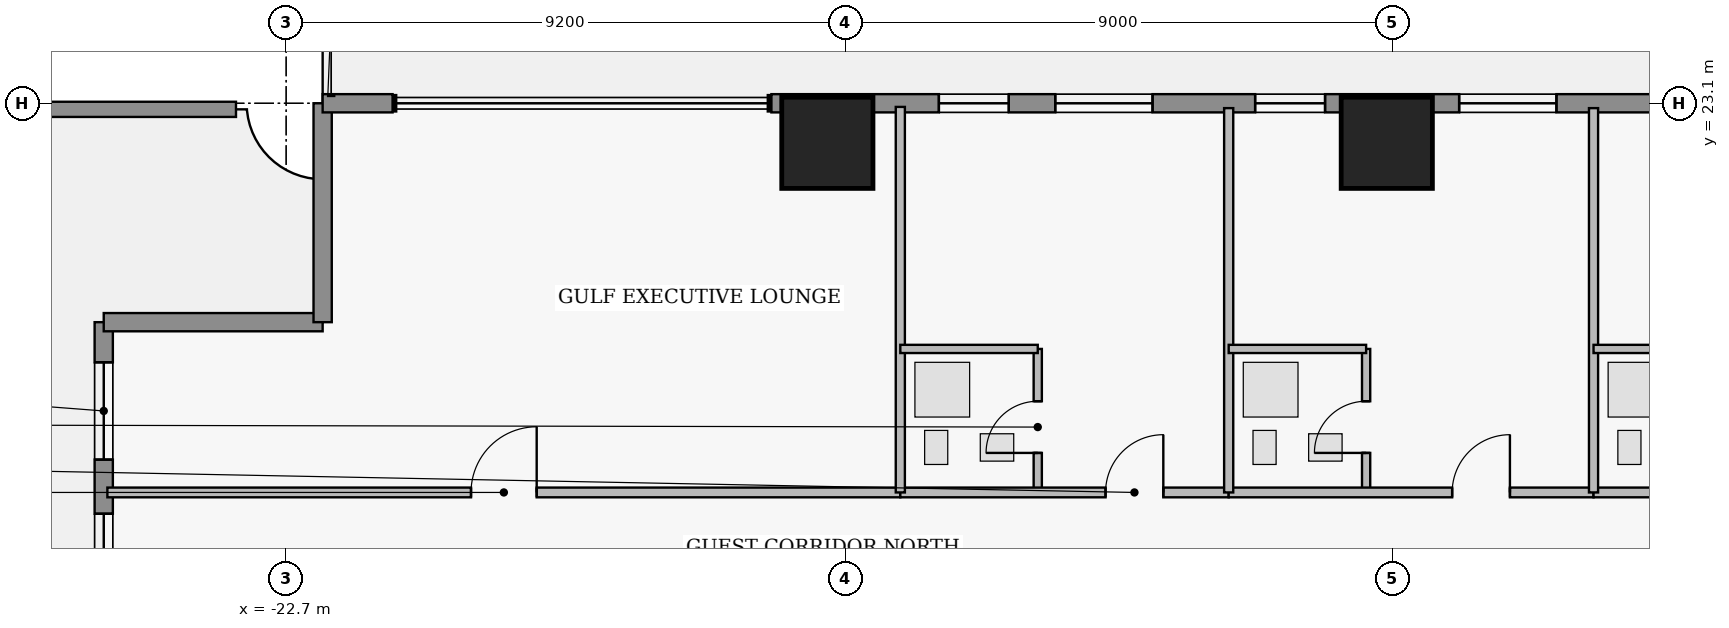
"""IFC4 building model, lengths in metres.
Left out: names, types, materials, properties, quantities, classifications, styles, units other than length and angle.
Written with IfcOpenShell. Run it as: python <this file> out.ifc"""

import sys

from ifc_helpers import new_model, si_unit, direction, frame, frame_2d, origin, origin_2d, place, context, subcontext, project, spatial, rectangle, extrude, element, fill, save


model = new_model("IFC4")
c1 = context("Model", 3, precision=1e-05, world=origin(), true_north=direction((0.0, 1.0)))
c2 = subcontext(c1, "Body", "Model", "MODEL_VIEW")
j1 = project(units=[si_unit("LENGTHUNIT", "METRE"), si_unit("PLANEANGLEUNIT", "RADIAN")], contexts=[c1])
p1 = place(None, origin())
s1 = spatial("IfcSite", under=j1, at=p1, CompositionType="ELEMENT")
p2 = place(p1, origin())
s2 = spatial("IfcBuilding", under=s1, at=p2, CompositionType="ELEMENT")
p3 = place(p2, frame((0.0, 0.0, 27.6)))
s3 = spatial("IfcBuildingStorey", under=s2, at=p3, CompositionType="ELEMENT", Elevation=27.6)
for number, where, z_axis, x_axis in (
    (1, (-13.8, 22.45, 0.0), (0.0, 0.0, 1.0), (1.0, 0.0, 0.0)),
    (2, (-4.6, 22.45, 0.0), (0.0, 0.0, 1.0), (1.0, 0.0, 0.0)),
):
    element("IfcColumn", number, at=place(p3, frame(where, z_axis=z_axis, x_axis=x_axis)), inside=s3, PredefinedType="COLUMN", context=c2, shape_type="SweptSolid", body=[
        extrude(rectangle(XDim=1.5, YDim=1.5, at=origin_2d()), origin(), (0.0, 0.0, 1.0), 3.65),
    ])
p4 = place(p3, frame((-31.82, 23.0, 0.0), z_axis=(0.0, 0.0, 1.0), x_axis=(1.0, 0.0, 0.0)))
e3 = element("IfcWall", 3, at=p4, inside=s3, PredefinedType="PARAPET", context=c2, shape_type="SweptSolid", body=[
    extrude(rectangle(XDim=8.295, YDim=0.25, at=frame_2d((4.147, 0.0))), origin(), (0.0, 0.0, 1.0), 1.15),
])
p5 = place(p3, frame((-25.7, 14.4, 0.0), z_axis=(0.0, 0.0, 1.0), x_axis=(0.0, 1.0, 0.0)))
e4 = element("IfcWall", 4, at=p5, inside=s3, PredefinedType="STANDARD", context=c2, shape_type="SweptSolid", body=[
    extrude(rectangle(XDim=5.1, YDim=0.3, at=frame_2d((2.55, 0.0))), origin(), (0.0, 0.0, 1.0), 3.43),
])
p6 = place(p5, frame((0.8, 0.0, 0.95)))
e5 = element("IfcOpeningElement", 5, at=p6, cuts=e4, PredefinedType="OPENING", context=c2, shape_type="SweptSolid", body=[
    extrude(rectangle(XDim=1.15, YDim=1.55, at=frame_2d((0.575, 0.775))), frame((0.0, 0.16, 0.0), z_axis=(0.0, -1.0, 0.0), x_axis=(1.0, 0.0, 0.0)), (0.0, 0.0, 1.0), 0.32),
])
p7 = place(p5, frame((2.84, 0.0, 0.85)))
e6 = element("IfcOpeningElement", 6, at=p7, cuts=e4, PredefinedType="OPENING", context=c2, shape_type="SweptSolid", body=[
    extrude(rectangle(XDim=1.6, YDim=1.8, at=frame_2d((0.8, 0.9))), frame((0.0, 0.16, 0.0), z_axis=(0.0, -1.0, 0.0), x_axis=(1.0, 0.0, 0.0)), (0.0, 0.0, 1.0), 0.32),
])
p8 = place(p3, frame((-25.7, 19.5, 0.0), z_axis=(0.0, 0.0, 1.0), x_axis=(1.0, 0.0, 0.0)))
e7 = element("IfcWall", 7, at=p8, inside=s3, PredefinedType="STANDARD", context=c2, shape_type="SweptSolid", body=[
    extrude(rectangle(XDim=3.6, YDim=0.3, at=frame_2d((1.8, 0.0))), origin(), (0.0, 0.0, 1.0), 3.43),
])
p9 = place(p3, frame((-22.1, 19.5, 0.0), z_axis=(0.0, 0.0, 1.0), x_axis=(0.0, 1.0, 0.0)))
e8 = element("IfcWall", 8, at=p9, inside=s3, PredefinedType="STANDARD", context=c2, shape_type="SweptSolid", body=[
    extrude(rectangle(XDim=3.6, YDim=0.3, at=frame_2d((1.8, 0.0))), origin(), (0.0, 0.0, 1.0), 3.43),
])
p10 = place(p3, frame((-22.1, 23.1, 0.0), z_axis=(0.0, 0.0, 1.0), x_axis=(1.0, 0.0, 0.0)))
e9 = element("IfcWall", 9, at=p10, inside=s3, PredefinedType="STANDARD", context=c2, shape_type="SweptSolid", body=[
    extrude(rectangle(XDim=1.15, YDim=0.3, at=frame_2d((0.575, 0.0))), origin(), (0.0, 0.0, 1.0), 3.43),
])
p11 = place(p3, frame((-14.72, 23.1, 0.0), z_axis=(0.0, 0.0, 1.0), x_axis=(1.0, 0.0, 0.0)))
e10 = element("IfcWall", 10, at=p11, inside=s3, PredefinedType="STANDARD", context=c2, shape_type="SweptSolid", body=[
    extrude(rectangle(XDim=20.24, YDim=0.3, at=frame_2d((10.12, 0.0))), origin(), (0.0, 0.0, 1.0), 3.43),
])
p12 = place(p11, frame((14.555, 0.0, 0.0)))
e11 = element("IfcOpeningElement", 11, at=p12, cuts=e10, PredefinedType="OPENING", context=c2, shape_type="SweptSolid", body=[
    extrude(rectangle(XDim=1.05, YDim=2.2, at=frame_2d((0.525, 1.1))), frame((0.0, 0.16, 0.0), z_axis=(0.0, -1.0, 0.0), x_axis=(1.0, 0.0, 0.0)), (0.0, 0.0, 1.0), 0.32),
])
p13 = place(p11, frame((4.668, 0.0, 0.85)))
e12 = element("IfcOpeningElement", 12, at=p13, cuts=e10, PredefinedType="OPENING", context=c2, shape_type="SweptSolid", body=[
    extrude(rectangle(XDim=1.6, YDim=1.8, at=frame_2d((0.8, 0.9))), frame((0.0, 0.16, 0.0), z_axis=(0.0, -1.0, 0.0), x_axis=(1.0, 0.0, 0.0)), (0.0, 0.0, 1.0), 0.32),
])
p14 = place(p11, frame((2.754, 0.0, 0.95)))
e13 = element("IfcOpeningElement", 13, at=p14, cuts=e10, PredefinedType="OPENING", context=c2, shape_type="SweptSolid", body=[
    extrude(rectangle(XDim=1.15, YDim=1.55, at=frame_2d((0.575, 0.775))), frame((0.0, 0.16, 0.0), z_axis=(0.0, -1.0, 0.0), x_axis=(1.0, 0.0, 0.0)), (0.0, 0.0, 1.0), 0.32),
])
p15 = place(p11, frame((7.955, 0.0, 0.95)))
e14 = element("IfcOpeningElement", 14, at=p15, cuts=e10, PredefinedType="OPENING", context=c2, shape_type="SweptSolid", body=[
    extrude(rectangle(XDim=1.15, YDim=1.55, at=frame_2d((0.575, 0.775))), frame((0.0, 0.16, 0.0), z_axis=(0.0, -1.0, 0.0), x_axis=(1.0, 0.0, 0.0)), (0.0, 0.0, 1.0), 0.32),
])
p16 = place(p11, frame((11.31, 0.0, 0.85)))
e15 = element("IfcOpeningElement", 15, at=p16, cuts=e10, PredefinedType="OPENING", context=c2, shape_type="SweptSolid", body=[
    extrude(rectangle(XDim=1.6, YDim=1.8, at=frame_2d((0.8, 0.9))), frame((0.0, 0.16, 0.0), z_axis=(0.0, -1.0, 0.0), x_axis=(1.0, 0.0, 0.0)), (0.0, 0.0, 1.0), 0.32),
])
p17 = place(p11, frame((16.427, 0.0, 0.85)))
e16 = element("IfcOpeningElement", 16, at=p17, cuts=e10, PredefinedType="OPENING", context=c2, shape_type="SweptSolid", body=[
    extrude(rectangle(XDim=1.6, YDim=1.8, at=frame_2d((0.8, 0.9))), frame((0.0, 0.16, 0.0), z_axis=(0.0, -1.0, 0.0), x_axis=(1.0, 0.0, 0.0)), (0.0, 0.0, 1.0), 0.32),
])
p18 = place(p3, frame((-25.64, 16.7, 0.0), z_axis=(0.0, 0.0, 1.0), x_axis=(1.0, 0.0, 0.0)))
e17 = element("IfcWall", 17, at=p18, inside=s3, PredefinedType="PARTITIONING", context=c2, shape_type="SweptSolid", body=[
    extrude(rectangle(XDim=13.04, YDim=0.16, at=frame_2d((6.52, 0.0))), origin(), (0.0, 0.0, 1.0), 2.973),
])
p19 = place(p18, frame((5.98, 0.0, 0.0)))
e18 = element("IfcOpeningElement", 18, at=p19, cuts=e17, PredefinedType="OPENING", context=c2, shape_type="SweptSolid", body=[
    extrude(rectangle(XDim=1.08, YDim=2.18, at=frame_2d((0.54, 1.09))), frame((0.0, 0.09, 0.0), z_axis=(0.0, -1.0, 0.0), x_axis=(1.0, 0.0, 0.0)), (0.0, 0.0, 1.0), 0.18),
])
p20 = place(p3, frame((-10.34, 16.7, 0.0), z_axis=(0.0, 0.0, 1.0), x_axis=(0.0, 1.0, 0.0)))
e19 = element("IfcWall", 19, at=p20, inside=s3, PredefinedType="PLUMBINGWALL", context=c2, shape_type="SweptSolid", body=[
    extrude(rectangle(XDim=2.36, YDim=0.135, at=frame_2d((1.18, 0.0))), origin(), (0.0, 0.0, 1.0), 3.43),
])
p21 = place(p20, frame((0.65, 0.0, 0.0)))
e20 = element("IfcOpeningElement", 20, at=p21, cuts=e19, PredefinedType="OPENING", context=c2, shape_type="SweptSolid", body=[
    extrude(rectangle(XDim=0.85, YDim=2.1, at=frame_2d((0.425, 1.05))), frame((0.0, 0.077, 0.0), z_axis=(0.0, -1.0, 0.0), x_axis=(1.0, 0.0, 0.0)), (0.0, 0.0, 1.0), 0.155),
])
p22 = place(p3, frame((-12.6, 16.7, 0.0), z_axis=(0.0, 0.0, 1.0), x_axis=(1.0, 0.0, 0.0)))
e21 = element("IfcWall", 21, at=p22, inside=s3, PredefinedType="PARTITIONING", context=c2, shape_type="SweptSolid", body=[
    extrude(rectangle(XDim=5.4, YDim=0.16, at=frame_2d((2.7, 0.0))), origin(), (0.0, 0.0, 1.0), 2.973),
])
p23 = place(p22, frame((3.375, 0.0, 0.0)))
e22 = element("IfcOpeningElement", 22, at=p23, cuts=e21, PredefinedType="OPENING", context=c2, shape_type="SweptSolid", body=[
    extrude(rectangle(XDim=0.95, YDim=2.15, at=frame_2d((0.475, 1.075))), frame((0.0, 0.09, 0.0), z_axis=(0.0, -1.0, 0.0), x_axis=(1.0, 0.0, 0.0)), (0.0, 0.0, 1.0), 0.18),
])
p24 = place(p3, frame((-4.94, 16.7, 0.0), z_axis=(0.0, 0.0, 1.0), x_axis=(0.0, 1.0, 0.0)))
e23 = element("IfcWall", 23, at=p24, inside=s3, PredefinedType="PLUMBINGWALL", context=c2, shape_type="SweptSolid", body=[
    extrude(rectangle(XDim=2.36, YDim=0.135, at=frame_2d((1.18, 0.0))), origin(), (0.0, 0.0, 1.0), 2.668),
])
p25 = place(p24, frame((0.65, 0.0, 0.0)))
e24 = element("IfcOpeningElement", 24, at=p25, cuts=e23, PredefinedType="OPENING", context=c2, shape_type="SweptSolid", body=[
    extrude(rectangle(XDim=0.85, YDim=2.1, at=frame_2d((0.425, 1.05))), frame((0.0, 0.077, 0.0), z_axis=(0.0, -1.0, 0.0), x_axis=(1.0, 0.0, 0.0)), (0.0, 0.0, 1.0), 0.155),
])
p26 = place(p3, frame((-7.2, 16.7, 0.0), z_axis=(0.0, 0.0, 1.0), x_axis=(1.0, 0.0, 0.0)))
e25 = element("IfcWall", 25, at=p26, inside=s3, PredefinedType="PARTITIONING", context=c2, shape_type="SweptSolid", body=[
    extrude(rectangle(XDim=6.0, YDim=0.16, at=frame_2d((3.0, 0.0))), origin(), (0.0, 0.0, 1.0), 2.973),
])
p27 = place(p26, frame((3.675, 0.0, 0.0)))
e26 = element("IfcOpeningElement", 26, at=p27, cuts=e25, PredefinedType="OPENING", context=c2, shape_type="SweptSolid", body=[
    extrude(rectangle(XDim=0.95, YDim=2.15, at=frame_2d((0.475, 1.075))), frame((0.0, 0.09, 0.0), z_axis=(0.0, -1.0, 0.0), x_axis=(1.0, 0.0, 0.0)), (0.0, 0.0, 1.0), 0.18),
])
p28 = place(p3, frame((-1.2, 16.7, 0.0), z_axis=(0.0, 0.0, 1.0), x_axis=(1.0, 0.0, 0.0)))
e27 = element("IfcWall", 27, at=p28, inside=s3, PredefinedType="PARTITIONING", context=c2, shape_type="SweptSolid", body=[
    extrude(rectangle(XDim=5.2, YDim=0.16, at=frame_2d((2.6, 0.0))), origin(), (0.0, 0.0, 1.0), 2.973),
])
p29 = place(p28, frame((3.275, 0.0, 0.0)))
e28 = element("IfcOpeningElement", 28, at=p29, cuts=e27, PredefinedType="OPENING", context=c2, shape_type="SweptSolid", body=[
    extrude(rectangle(XDim=0.95, YDim=2.15, at=frame_2d((0.475, 1.075))), frame((0.0, 0.09, 0.0), z_axis=(0.0, -1.0, 0.0), x_axis=(1.0, 0.0, 0.0)), (0.0, 0.0, 1.0), 0.18),
])
p30 = place(p3, frame((-12.6, 16.7, 0.0), z_axis=(0.0, 0.0, 1.0), x_axis=(0.0, 1.0, 0.0)))
e29 = element("IfcWall", 29, at=p30, inside=s3, PredefinedType="PARTITIONING", context=c2, shape_type="SweptSolid", body=[
    extrude(rectangle(XDim=6.34, YDim=0.15, at=frame_2d((3.17, 0.0))), origin(), (0.0, 0.0, 1.0), 3.43),
])
p31 = place(p3, frame((-12.6, 19.06, 0.0), z_axis=(0.0, 0.0, 1.0), x_axis=(1.0, 0.0, 0.0)))
e30 = element("IfcWall", 30, at=p31, inside=s3, PredefinedType="PLUMBINGWALL", context=c2, shape_type="SweptSolid", body=[
    extrude(rectangle(XDim=2.26, YDim=0.135, at=frame_2d((1.13, 0.0))), origin(), (0.0, 0.0, 1.0), 2.973),
])
p32 = place(p3, frame((-7.2, 16.7, 0.0), z_axis=(0.0, 0.0, 1.0), x_axis=(0.0, 1.0, 0.0)))
e31 = element("IfcWall", 31, at=p32, inside=s3, PredefinedType="PARTITIONING", context=c2, shape_type="SweptSolid", body=[
    extrude(rectangle(XDim=6.32, YDim=0.15, at=frame_2d((3.16, 0.0))), origin(), (0.0, 0.0, 1.0), 3.43),
])
p33 = place(p3, frame((-7.2, 19.06, 0.0), z_axis=(0.0, 0.0, 1.0), x_axis=(1.0, 0.0, 0.0)))
e32 = element("IfcWall", 32, at=p33, inside=s3, PredefinedType="PLUMBINGWALL", context=c2, shape_type="SweptSolid", body=[
    extrude(rectangle(XDim=2.26, YDim=0.135, at=frame_2d((1.13, 0.0))), origin(), (0.0, 0.0, 1.0), 2.973),
])
p34 = place(p3, frame((-1.2, 16.7, 0.0), z_axis=(0.0, 0.0, 1.0), x_axis=(0.0, 1.0, 0.0)))
e33 = element("IfcWall", 33, at=p34, inside=s3, PredefinedType="PARTITIONING", context=c2, shape_type="SweptSolid", body=[
    extrude(rectangle(XDim=6.32, YDim=0.15, at=frame_2d((3.16, 0.0))), origin(), (0.0, 0.0, 1.0), 3.43),
])
p35 = place(p3, frame((-1.2, 19.06, 0.0), z_axis=(0.0, 0.0, 1.0), x_axis=(1.0, 0.0, 0.0)))
e34 = element("IfcWall", 34, at=p35, inside=s3, PredefinedType="PLUMBINGWALL", context=c2, shape_type="SweptSolid", body=[
    extrude(rectangle(XDim=2.26, YDim=0.135, at=frame_2d((1.13, 0.0))), origin(), (0.0, 0.0, 1.0), 2.973),
])
p36 = place(p6, origin())
e35 = element("IfcWindow", 35, at=p36, inside=s3, PartitioningType="SINGLE_PANEL", PredefinedType="WINDOW", context=c2, shape_type="SweptSolid", body=[
    extrude(rectangle(XDim=1.15, YDim=1.55, at=frame_2d((0.575, 0.775))), frame((0.0, 0.03, 0.0), z_axis=(0.0, -1.0, 0.0), x_axis=(1.0, 0.0, 0.0)), (0.0, 0.0, 1.0), 0.06),
])
fill(e5, e35)
p37 = place(p7, origin())
e36 = element("IfcWindow", 36, at=p37, inside=s3, PartitioningType="SINGLE_PANEL", PredefinedType="WINDOW", context=c2, shape_type="SweptSolid", body=[
    extrude(rectangle(XDim=1.6, YDim=1.8, at=frame_2d((0.8, 0.9))), frame((0.0, 0.03, 0.0), z_axis=(0.0, -1.0, 0.0), x_axis=(1.0, 0.0, 0.0)), (0.0, 0.0, 1.0), 0.06),
])
fill(e6, e36)
p38 = place(p13, origin())
e37 = element("IfcWindow", 37, at=p38, inside=s3, PartitioningType="SINGLE_PANEL", PredefinedType="WINDOW", context=c2, shape_type="SweptSolid", body=[
    extrude(rectangle(XDim=1.6, YDim=1.8, at=frame_2d((0.8, 0.9))), frame((0.0, 0.03, 0.0), z_axis=(0.0, -1.0, 0.0), x_axis=(1.0, 0.0, 0.0)), (0.0, 0.0, 1.0), 0.06),
])
fill(e12, e37)
p39 = place(p14, origin())
e38 = element("IfcWindow", 38, at=p39, inside=s3, PartitioningType="SINGLE_PANEL", PredefinedType="WINDOW", context=c2, shape_type="SweptSolid", body=[
    extrude(rectangle(XDim=1.15, YDim=1.55, at=frame_2d((0.575, 0.775))), frame((0.0, 0.03, 0.0), z_axis=(0.0, -1.0, 0.0), x_axis=(1.0, 0.0, 0.0)), (0.0, 0.0, 1.0), 0.06),
])
fill(e13, e38)
p40 = place(p15, origin())
e39 = element("IfcWindow", 39, at=p40, inside=s3, PartitioningType="SINGLE_PANEL", PredefinedType="WINDOW", context=c2, shape_type="SweptSolid", body=[
    extrude(rectangle(XDim=1.15, YDim=1.55, at=frame_2d((0.575, 0.775))), frame((0.0, 0.03, 0.0), z_axis=(0.0, -1.0, 0.0), x_axis=(1.0, 0.0, 0.0)), (0.0, 0.0, 1.0), 0.06),
])
fill(e14, e39)
p41 = place(p16, origin())
e40 = element("IfcWindow", 40, at=p41, inside=s3, PartitioningType="SINGLE_PANEL", PredefinedType="WINDOW", context=c2, shape_type="SweptSolid", body=[
    extrude(rectangle(XDim=1.6, YDim=1.8, at=frame_2d((0.8, 0.9))), frame((0.0, 0.03, 0.0), z_axis=(0.0, -1.0, 0.0), x_axis=(1.0, 0.0, 0.0)), (0.0, 0.0, 1.0), 0.06),
])
fill(e15, e40)
p42 = place(p19, origin())
e41 = element("IfcDoor", 41, at=p42, inside=s3, OperationType="SINGLE_SWING_RIGHT", PredefinedType="DOOR", context=c2, shape_type="SweptSolid", body=[
    extrude(rectangle(XDim=1.08, YDim=2.18, at=frame_2d((0.54, 1.09))), frame((0.0, 0.025, 0.0), z_axis=(0.0, -1.0, 0.0), x_axis=(1.0, 0.0, 0.0)), (0.0, 0.0, 1.0), 0.05),
])
fill(e18, e41)
p43 = place(p21, origin())
e42 = element("IfcDoor", 42, at=p43, inside=s3, OperationType="SINGLE_SWING_LEFT", PredefinedType="DOOR", context=c2, shape_type="SweptSolid", body=[
    extrude(rectangle(XDim=0.85, YDim=2.1, at=frame_2d((0.425, 1.05))), frame((0.0, 0.025, 0.0), z_axis=(0.0, -1.0, 0.0), x_axis=(1.0, 0.0, 0.0)), (0.0, 0.0, 1.0), 0.05),
])
fill(e20, e42)
p44 = place(p23, origin())
e43 = element("IfcDoor", 43, at=p44, inside=s3, OperationType="SINGLE_SWING_RIGHT", PredefinedType="DOOR", context=c2, shape_type="SweptSolid", body=[
    extrude(rectangle(XDim=0.95, YDim=2.15, at=frame_2d((0.475, 1.075))), frame((0.0, 0.025, 0.0), z_axis=(0.0, -1.0, 0.0), x_axis=(1.0, 0.0, 0.0)), (0.0, 0.0, 1.0), 0.05),
])
fill(e22, e43)
p45 = place(p25, origin())
e44 = element("IfcDoor", 44, at=p45, inside=s3, OperationType="SINGLE_SWING_LEFT", PredefinedType="DOOR", context=c2, shape_type="SweptSolid", body=[
    extrude(rectangle(XDim=0.85, YDim=2.1, at=frame_2d((0.425, 1.05))), frame((0.0, 0.025, 0.0), z_axis=(0.0, -1.0, 0.0), x_axis=(1.0, 0.0, 0.0)), (0.0, 0.0, 1.0), 0.05),
])
fill(e24, e44)
p46 = place(p27, origin())
e45 = element("IfcDoor", 45, at=p46, inside=s3, OperationType="SINGLE_SWING_RIGHT", PredefinedType="DOOR", context=c2, shape_type="SweptSolid", body=[
    extrude(rectangle(XDim=0.95, YDim=2.15, at=frame_2d((0.475, 1.075))), frame((0.0, 0.025, 0.0), z_axis=(0.0, -1.0, 0.0), x_axis=(1.0, 0.0, 0.0)), (0.0, 0.0, 1.0), 0.05),
])
fill(e26, e45)
save(model, sys.argv[1])
